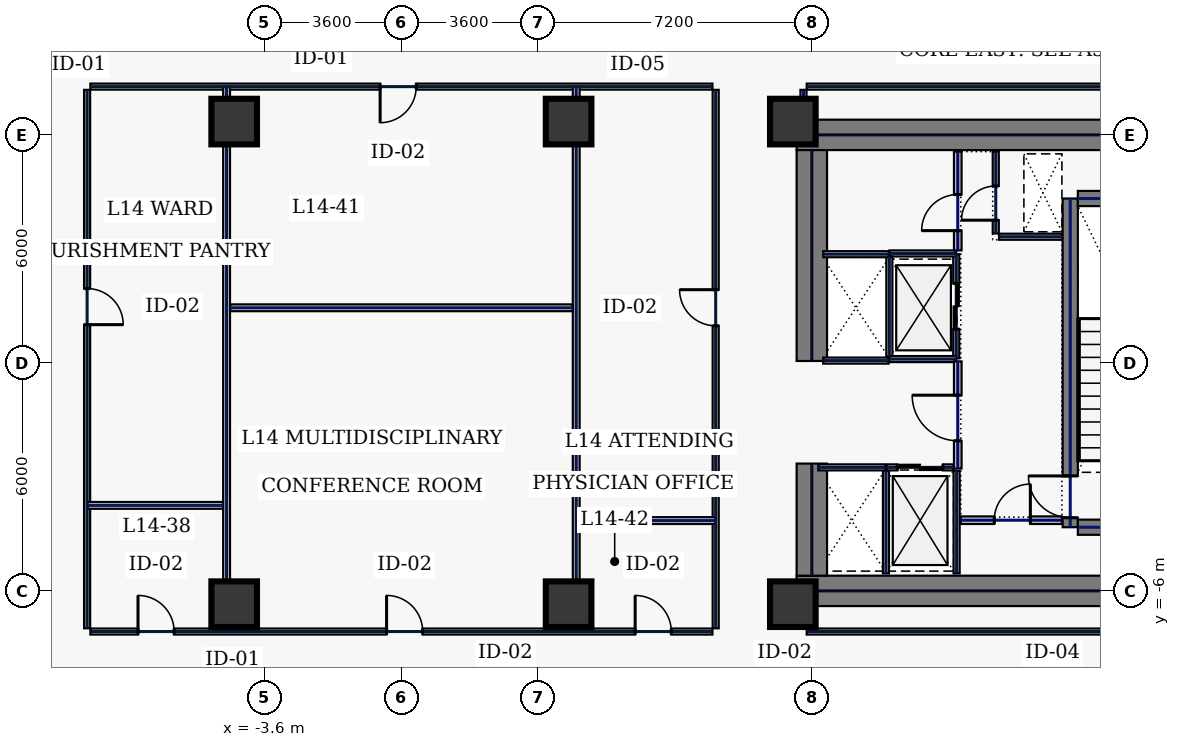
"""IFC4 building model, lengths in metres.
Left out: names, types, materials, properties, quantities, classifications, styles, units other than length and angle.
Written with IfcOpenShell. Run it as: python <this file> out.ifc"""

import sys

from ifc_helpers import new_model, si_unit, direction, frame, frame_2d, origin, origin_2d, place, context, subcontext, project, spatial, rectangle, hollow_rectangle, extrude, element, fill, save


model = new_model("IFC4")
c1 = context("Model", 3, precision=1e-05, world=origin(), true_north=direction((0.0, 1.0)))
c2 = subcontext(c1, "Body", "Model", "MODEL_VIEW")
j1 = project(units=[si_unit("LENGTHUNIT", "METRE"), si_unit("PLANEANGLEUNIT", "RADIAN")], contexts=[c1])
p1 = place(None, origin())
s1 = spatial("IfcSite", under=j1, at=p1, CompositionType="ELEMENT")
p2 = place(p1, origin())
s2 = spatial("IfcBuilding", under=s1, at=p2, CompositionType="ELEMENT")
p3 = place(p2, frame((0.0, 0.0, 67.4)))
s3 = spatial("IfcBuildingStorey", under=s2, at=p3, CompositionType="ELEMENT", Elevation=67.4)
for number, where, z_axis, x_axis in (
    (1, (10.4, 6.0, 0.0), (0.0, 0.0, 1.0), (1.0, 0.0, 0.0)),
    (2, (10.4, -6.0, 0.0), (0.0, 0.0, 1.0), (1.0, 0.0, 0.0)),
):
    element("IfcWall", number, at=place(p3, frame(where, z_axis=z_axis, x_axis=x_axis)), inside=s3, PredefinedType="SHEAR", context=c2, shape_type="SweptSolid", body=[
        extrude(rectangle(XDim=11.6, YDim=0.8, at=frame_2d((5.8, 0.0))), origin(), (0.0, 0.0, 1.0), 3.74),
    ])
p4 = place(p3, frame((10.8, -5.6, 0.0), z_axis=(0.0, 0.0, 1.0), x_axis=(0.0, 1.0, 0.0)))
e3 = element("IfcWall", 3, at=p4, inside=s3, PredefinedType="SHEAR", context=c2, shape_type="SweptSolid", body=[
    extrude(rectangle(XDim=2.95, YDim=0.8, at=frame_2d((1.475, 0.0))), origin(), (0.0, 0.0, 1.0), 3.74),
])
p5 = place(p3, frame((10.8, 0.05, 0.0), z_axis=(0.0, 0.0, 1.0), x_axis=(0.0, 1.0, 0.0)))
e4 = element("IfcWall", 4, at=p5, inside=s3, PredefinedType="SHEAR", context=c2, shape_type="SweptSolid", body=[
    extrude(rectangle(XDim=5.55, YDim=0.8, at=frame_2d((2.775, 0.0))), origin(), (0.0, 0.0, 1.0), 3.74),
])
p6 = place(p3, frame((17.6, -4.325, 0.0), z_axis=(0.0, 0.0, 1.0), x_axis=(0.0, 1.0, 0.0)))
e5 = element("IfcWall", 5, at=p6, inside=s3, PredefinedType="SHEAR", context=c2, shape_type="SweptSolid", body=[
    extrude(rectangle(XDim=8.65, YDim=0.4, at=frame_2d((4.325, 0.0))), origin(), (0.0, 0.0, 1.0), 3.74),
])
p7 = place(p6, frame((0.25, 0.0, 0.0)))
e6 = element("IfcOpeningElement", 6, at=p7, cuts=e5, PredefinedType="OPENING", context=c2, shape_type="SweptSolid", body=[
    extrude(rectangle(XDim=1.1, YDim=2.2, at=frame_2d((0.55, 1.1))), frame((0.0, 0.21, 0.0), z_axis=(0.0, -1.0, 0.0), x_axis=(1.0, 0.0, 0.0)), (0.0, 0.0, 1.0), 0.42),
])
for number, where, z_axis, x_axis in (
    (7, (17.8, -4.325, 0.0), (0.0, 0.0, 1.0), (1.0, 0.0, 0.0)),
    (8, (17.8, 4.325, 0.0), (0.0, 0.0, 1.0), (1.0, 0.0, 0.0)),
):
    element("IfcWall", number, at=place(p3, frame(where, z_axis=z_axis, x_axis=x_axis)), inside=s3, PredefinedType="SHEAR", context=c2, shape_type="SweptSolid", body=[
        extrude(rectangle(XDim=3.4, YDim=0.4, at=frame_2d((1.7, 0.0))), origin(), (0.0, 0.0, 1.0), 3.74),
    ])
for number, where, z_axis, x_axis in (
    (9, (10.3, -6.35, 0.0), (0.0, 0.0, 1.0), (1.0, 0.0, 0.0)),
    (10, (10.3, 6.35, 0.0), (0.0, 0.0, 1.0), (1.0, 0.0, 0.0)),
    (11, (-4.4, -6.35, 0.0), (0.0, 0.0, 1.0), (1.0, 0.0, 0.0)),
    (12, (4.4, -6.35, 0.0), (0.0, 0.0, 1.0), (1.0, 0.0, 0.0)),
    (13, (-4.4, 6.35, 0.0), (0.0, 0.0, 1.0), (1.0, 0.0, 0.0)),
    (14, (4.4, 6.35, 0.0), (0.0, 0.0, 1.0), (1.0, 0.0, 0.0)),
):
    element("IfcColumn", number, at=place(p3, frame(where, z_axis=z_axis, x_axis=x_axis)), inside=s3, PredefinedType="COLUMN", context=c2, shape_type="SweptSolid", body=[
        extrude(hollow_rectangle(XDim=1.2, YDim=1.2, WallThickness=0.05, at=origin_2d()), origin(), (0.0, 0.0, 1.0), 3.74),
    ])
p8 = place(p3, frame((14.6, 0.12, 0.0), z_axis=(0.0, 0.0, 1.0), x_axis=(0.0, 1.0, 0.0)))
e15 = element("IfcWall", 15, at=p8, inside=s3, PredefinedType="PARTITIONING", context=c2, shape_type="SweptSolid", body=[
    extrude(rectangle(XDim=2.74, YDim=0.16, at=frame_2d((1.37, 0.0))), origin(), (0.0, 0.0, 1.0), 3.74),
])
p9 = place(p8, frame((0.77, 0.0, 0.0)))
e16 = element("IfcOpeningElement", 16, at=p9, cuts=e15, PredefinedType="OPENING", context=c2, shape_type="SweptSolid", body=[
    extrude(rectangle(XDim=1.2, YDim=2.2, at=frame_2d((0.6, 1.1))), frame((0.0, 0.09, 0.0), z_axis=(0.0, -1.0, 0.0), x_axis=(1.0, 0.0, 0.0)), (0.0, 0.0, 1.0), 0.18),
])
for number, where, z_axis, x_axis in (
    (17, (12.84, 0.1, 0.0), (0.0, 0.0, 1.0), (1.0, 0.0, 0.0)),
    (18, (12.84, 2.88, 0.0), (0.0, 0.0, 1.0), (1.0, 0.0, 0.0)),
):
    element("IfcWall", number, at=place(p3, frame(where, z_axis=z_axis, x_axis=x_axis)), inside=s3, PredefinedType="PARTITIONING", context=c2, shape_type="SweptSolid", body=[
        extrude(rectangle(XDim=1.76, YDim=0.16, at=frame_2d((0.88, 0.0))), origin(), (0.0, 0.0, 1.0), 3.74),
    ])
p10 = place(p3, frame((12.84, 0.18, 0.0), z_axis=(0.0, 0.0, 1.0), x_axis=(0.0, 1.0, 0.0)))
e19 = element("IfcWall", 19, at=p10, inside=s3, PredefinedType="PARTITIONING", context=c2, shape_type="SweptSolid", body=[
    extrude(rectangle(XDim=2.62, YDim=0.16, at=frame_2d((1.31, 0.0))), origin(), (0.0, 0.0, 1.0), 3.74),
])
p11 = place(p3, frame((12.77, -2.75, 0.0), z_axis=(0.0, 0.0, 1.0), x_axis=(1.0, 0.0, 0.0)))
e20 = element("IfcWall", 20, at=p11, inside=s3, PredefinedType="PARTITIONING", context=c2, shape_type="SweptSolid", body=[
    extrude(rectangle(XDim=1.76, YDim=0.16, at=frame_2d((0.88, 0.0))), origin(), (0.0, 0.0, 1.0), 3.74),
])
p12 = place(p11, frame((0.28, 0.0, 0.0)))
e21 = element("IfcOpeningElement", 21, at=p12, cuts=e20, PredefinedType="OPENING", context=c2, shape_type="SweptSolid", body=[
    extrude(rectangle(XDim=1.2, YDim=2.2, at=frame_2d((0.6, 1.1))), frame((0.0, 0.09, 0.0), z_axis=(0.0, -1.0, 0.0), x_axis=(1.0, 0.0, 0.0)), (0.0, 0.0, 1.0), 0.18),
])
for number, where, z_axis, x_axis in (
    (22, (12.75, -5.54, 0.0), (0.0, 0.0, 1.0), (0.0, 1.0, 0.0)),
    (23, (14.61, -5.54, 0.0), (0.0, 0.0, 1.0), (0.0, 1.0, 0.0)),
):
    element("IfcWall", number, at=place(p3, frame(where, z_axis=z_axis, x_axis=x_axis)), inside=s3, PredefinedType="PARTITIONING", context=c2, shape_type="SweptSolid", body=[
        extrude(rectangle(XDim=2.7, YDim=0.16, at=frame_2d((1.35, 0.0))), origin(), (0.0, 0.0, 1.0), 3.74),
    ])
p13 = place(p3, frame((10.97, -2.75, 0.0), z_axis=(0.0, 0.0, 1.0), x_axis=(1.0, 0.0, 0.0)))
e24 = element("IfcWall", 24, at=p13, inside=s3, PredefinedType="PARTITIONING", context=c2, shape_type="SweptSolid", body=[
    extrude(rectangle(XDim=1.76, YDim=0.16, at=frame_2d((0.88, 0.0))), origin(), (0.0, 0.0, 1.0), 3.74),
])
for number, where, z_axis, x_axis in (
    (25, (11.1, 0.06, 0.0), (0.0, 0.0, 1.0), (1.0, 0.0, 0.0)),
    (26, (11.1, 2.86, 0.0), (0.0, 0.0, 1.0), (1.0, 0.0, 0.0)),
):
    element("IfcWall", number, at=place(p3, frame(where, z_axis=z_axis, x_axis=x_axis)), inside=s3, PredefinedType="PARTITIONING", context=c2, shape_type="SweptSolid", body=[
        extrude(rectangle(XDim=1.72, YDim=0.16, at=frame_2d((0.86, 0.0))), origin(), (0.0, 0.0, 1.0), 3.74),
    ])
p14 = place(p3, frame((15.64, 3.405, 0.0), z_axis=(0.0, 0.0, 1.0), x_axis=(0.0, 1.0, 0.0)))
e27 = element("IfcWall", 27, at=p14, inside=s3, PredefinedType="PARTITIONING", context=c2, shape_type="SweptSolid", body=[
    extrude(rectangle(XDim=2.155, YDim=0.16, at=frame_2d((1.078, 0.0))), origin(), (0.0, 0.0, 1.0), 3.74),
])
p15 = place(p14, frame((0.35, 0.0, 0.0)))
e28 = element("IfcOpeningElement", 28, at=p15, cuts=e27, PredefinedType="OPENING", context=c2, shape_type="SweptSolid", body=[
    extrude(rectangle(XDim=0.9, YDim=2.2, at=frame_2d((0.45, 1.1))), frame((0.0, 0.09, 0.0), z_axis=(0.0, -1.0, 0.0), x_axis=(1.0, 0.0, 0.0)), (0.0, 0.0, 1.0), 0.18),
])
p16 = place(p3, frame((15.725, 3.32, 0.0), z_axis=(0.0, 0.0, 1.0), x_axis=(1.0, 0.0, 0.0)))
e29 = element("IfcWall", 29, at=p16, inside=s3, PredefinedType="PARTITIONING", context=c2, shape_type="SweptSolid", body=[
    extrude(rectangle(XDim=1.655, YDim=0.16, at=frame_2d((0.827, 0.0))), origin(), (0.0, 0.0, 1.0), 3.74),
])
p17 = place(p3, frame((14.72, -4.14, 0.0), z_axis=(0.0, 0.0, 1.0), x_axis=(1.0, 0.0, 0.0)))
e30 = element("IfcWall", 30, at=p17, inside=s3, PredefinedType="SOLIDWALL", context=c2, shape_type="SweptSolid", body=[
    extrude(rectangle(XDim=2.66, YDim=0.2, at=frame_2d((1.33, 0.0))), origin(), (0.0, 0.0, 1.0), 3.74),
])
p18 = place(p17, frame((0.88, 0.0, 0.0)))
e31 = element("IfcOpeningElement", 31, at=p18, cuts=e30, PredefinedType="OPENING", context=c2, shape_type="SweptSolid", body=[
    extrude(rectangle(XDim=0.95, YDim=2.2, at=frame_2d((0.475, 1.1))), frame((0.0, 0.11, 0.0), z_axis=(0.0, -1.0, 0.0), x_axis=(1.0, 0.0, 0.0)), (0.0, 0.0, 1.0), 0.22),
])
p19 = place(p3, frame((14.64, 2.96, 0.0), z_axis=(0.0, 0.0, 1.0), x_axis=(0.0, 1.0, 0.0)))
e32 = element("IfcWall", 32, at=p19, inside=s3, PredefinedType="SOLIDWALL", context=c2, shape_type="SweptSolid", body=[
    extrude(rectangle(XDim=2.6, YDim=0.2, at=frame_2d((1.3, 0.0))), origin(), (0.0, 0.0, 1.0), 3.74),
])
p20 = place(p19, frame((0.52, 0.0, 0.0)))
e33 = element("IfcOpeningElement", 33, at=p20, cuts=e32, PredefinedType="OPENING", context=c2, shape_type="SweptSolid", body=[
    extrude(rectangle(XDim=0.95, YDim=2.2, at=frame_2d((0.475, 1.1))), frame((0.0, 0.11, 0.0), z_axis=(0.0, -1.0, 0.0), x_axis=(1.0, 0.0, 0.0)), (0.0, 0.0, 1.0), 0.22),
])
p21 = place(p3, frame((14.64, -2.78, 0.0), z_axis=(0.0, 0.0, 1.0), x_axis=(0.0, 1.0, 0.0)))
e34 = element("IfcWall", 34, at=p21, inside=s3, PredefinedType="SOLIDWALL", context=c2, shape_type="SweptSolid", body=[
    extrude(rectangle(XDim=2.82, YDim=0.2, at=frame_2d((1.41, 0.0))), origin(), (0.0, 0.0, 1.0), 3.74),
])
p22 = place(p21, frame((0.73, 0.0, 0.0)))
e35 = element("IfcOpeningElement", 35, at=p22, cuts=e34, PredefinedType="OPENING", context=c2, shape_type="SweptSolid", body=[
    extrude(rectangle(XDim=1.2, YDim=2.2, at=frame_2d((0.6, 1.1))), frame((0.0, 0.11, 0.0), z_axis=(0.0, -1.0, 0.0), x_axis=(1.0, 0.0, 0.0)), (0.0, 0.0, 1.0), 0.22),
])
p23 = place(p3, frame((27.185, 7.27, 0.0), z_axis=(0.0, 0.0, 1.0), x_axis=(-1.0, 0.0, 0.0)))
e36 = element("IfcWall", 36, at=p23, inside=s3, PredefinedType="PARTITIONING", context=c2, shape_type="SweptSolid", body=[
    extrude(rectangle(XDim=16.52, YDim=0.16, at=frame_2d((8.26, 0.0))), origin(), (0.0, 0.0, 1.0), 3.74),
])
p24 = place(p3, frame((10.58, 7.185, 0.0), z_axis=(0.0, 0.0, 1.0), x_axis=(0.0, -1.0, 0.0)))
e37 = element("IfcWall", 37, at=p24, inside=s3, PredefinedType="PARTITIONING", context=c2, shape_type="SweptSolid", body=[
    extrude(rectangle(XDim=0.765, YDim=0.16, at=frame_2d((0.383, 0.0))), origin(), (0.0, 0.0, 1.0), 1.535),
])
p25 = place(p3, frame((10.58, -6.42, 0.0), z_axis=(0.0, 0.0, 1.0), x_axis=(0.0, -1.0, 0.0)))
e38 = element("IfcWall", 38, at=p25, inside=s3, PredefinedType="PARTITIONING", context=c2, shape_type="SweptSolid", body=[
    extrude(rectangle(XDim=0.565, YDim=0.16, at=frame_2d((0.283, 0.0))), origin(), (0.0, 0.0, 1.0), 3.74),
])
p26 = place(p3, frame((10.665, -7.07, 0.0), z_axis=(0.0, 0.0, 1.0), x_axis=(1.0, 0.0, 0.0)))
e39 = element("IfcWall", 39, at=p26, inside=s3, PredefinedType="PARTITIONING", context=c2, shape_type="SweptSolid", body=[
    extrude(rectangle(XDim=16.52, YDim=0.16, at=frame_2d((8.26, 0.0))), origin(), (0.0, 0.0, 1.0), 3.74),
])
p27 = place(p3, frame((8.27, -6.985, 0.0), z_axis=(0.0, 0.0, 1.0), x_axis=(0.0, 1.0, 0.0)))
e40 = element("IfcWall", 40, at=p27, inside=s3, PredefinedType="PARTITIONING", context=c2, shape_type="SweptSolid", body=[
    extrude(rectangle(XDim=14.17, YDim=0.16, at=frame_2d((7.085, 0.0))), origin(), (0.0, 0.0, 1.0), 3.74),
])
p28 = place(p27, frame((7.961, 0.0, 0.0)))
e41 = element("IfcOpeningElement", 41, at=p28, cuts=e40, PredefinedType="OPENING", context=c2, shape_type="SweptSolid", body=[
    extrude(rectangle(XDim=0.95, YDim=2.2, at=frame_2d((0.475, 1.1))), frame((0.0, 0.09, 0.0), z_axis=(0.0, -1.0, 0.0), x_axis=(1.0, 0.0, 0.0)), (0.0, 0.0, 1.0), 0.18),
])
p29 = place(p3, frame((8.185, 7.27, 0.0), z_axis=(0.0, 0.0, 1.0), x_axis=(-1.0, 0.0, 0.0)))
e42 = element("IfcWall", 42, at=p29, inside=s3, PredefinedType="PARTITIONING", context=c2, shape_type="SweptSolid", body=[
    extrude(rectangle(XDim=16.37, YDim=0.16, at=frame_2d((8.185, 0.0))), origin(), (0.0, 0.0, 1.0), 3.74),
])
p30 = place(p29, frame((7.795, 0.0, 0.0)))
e43 = element("IfcOpeningElement", 43, at=p30, cuts=e42, PredefinedType="OPENING", context=c2, shape_type="SweptSolid", body=[
    extrude(rectangle(XDim=0.95, YDim=2.2, at=frame_2d((0.475, 1.1))), frame((0.0, 0.09, 0.0), z_axis=(0.0, -1.0, 0.0), x_axis=(1.0, 0.0, 0.0)), (0.0, 0.0, 1.0), 0.18),
])
p31 = place(p3, frame((-8.27, 7.185, 0.0), z_axis=(0.0, 0.0, 1.0), x_axis=(0.0, -1.0, 0.0)))
e44 = element("IfcWall", 44, at=p31, inside=s3, PredefinedType="PARTITIONING", context=c2, shape_type="SweptSolid", body=[
    extrude(rectangle(XDim=14.17, YDim=0.16, at=frame_2d((7.085, 0.0))), origin(), (0.0, 0.0, 1.0), 3.74),
])
p32 = place(p31, frame((5.229, 0.0, 0.0)))
e45 = element("IfcOpeningElement", 45, at=p32, cuts=e44, PredefinedType="OPENING", context=c2, shape_type="SweptSolid", body=[
    extrude(rectangle(XDim=0.95, YDim=2.2, at=frame_2d((0.475, 1.1))), frame((0.0, 0.09, 0.0), z_axis=(0.0, -1.0, 0.0), x_axis=(1.0, 0.0, 0.0)), (0.0, 0.0, 1.0), 0.18),
])
p33 = place(p3, frame((-8.185, -7.07, 0.0), z_axis=(0.0, 0.0, 1.0), x_axis=(1.0, 0.0, 0.0)))
e46 = element("IfcWall", 46, at=p33, inside=s3, PredefinedType="PARTITIONING", context=c2, shape_type="SweptSolid", body=[
    extrude(rectangle(XDim=16.37, YDim=0.16, at=frame_2d((8.185, 0.0))), origin(), (0.0, 0.0, 1.0), 3.74),
])
p34 = place(p33, frame((1.254, 0.0, 0.0)))
e47 = element("IfcOpeningElement", 47, at=p34, cuts=e46, PredefinedType="OPENING", context=c2, shape_type="SweptSolid", body=[
    extrude(rectangle(XDim=0.95, YDim=2.2, at=frame_2d((0.475, 1.1))), frame((0.0, 0.09, 0.0), z_axis=(0.0, -1.0, 0.0), x_axis=(1.0, 0.0, 0.0)), (0.0, 0.0, 1.0), 0.18),
])
p35 = place(p33, frame((7.795, 0.0, 0.0)))
e48 = element("IfcOpeningElement", 48, at=p35, cuts=e46, PredefinedType="OPENING", context=c2, shape_type="SweptSolid", body=[
    extrude(rectangle(XDim=0.95, YDim=2.2, at=frame_2d((0.475, 1.1))), frame((0.0, 0.09, 0.0), z_axis=(0.0, -1.0, 0.0), x_axis=(1.0, 0.0, 0.0)), (0.0, 0.0, 1.0), 0.18),
])
p36 = place(p33, frame((14.336, 0.0, 0.0)))
e49 = element("IfcOpeningElement", 49, at=p36, cuts=e46, PredefinedType="OPENING", context=c2, shape_type="SweptSolid", body=[
    extrude(rectangle(XDim=0.95, YDim=2.2, at=frame_2d((0.475, 1.1))), frame((0.0, 0.09, 0.0), z_axis=(0.0, -1.0, 0.0), x_axis=(1.0, 0.0, 0.0)), (0.0, 0.0, 1.0), 0.18),
])
for number, where, z_axis, x_axis in (
    (50, (-4.6, -7.065, 0.0), (0.0, 0.0, 1.0), (0.0, 1.0, 0.0)),
    (51, (4.6, -7.065, 0.0), (0.0, 0.0, 1.0), (0.0, 1.0, 0.0)),
):
    element("IfcWall", number, at=place(p3, frame(where, z_axis=z_axis, x_axis=x_axis)), inside=s3, PredefinedType="PARTITIONING", context=c2, shape_type="SweptSolid", body=[
        extrude(rectangle(XDim=14.33, YDim=0.18, at=frame_2d((7.165, 0.0))), origin(), (0.0, 0.0, 1.0), 2.935),
    ])
p37 = place(p3, frame((-4.505, 1.45, 0.0), z_axis=(0.0, 0.0, 1.0), x_axis=(1.0, 0.0, 0.0)))
e52 = element("IfcWall", 52, at=p37, inside=s3, PredefinedType="PARTITIONING", context=c2, shape_type="SweptSolid", body=[
    extrude(rectangle(XDim=9.01, YDim=0.18, at=frame_2d((4.505, 0.0))), origin(), (0.0, 0.0, 1.0), 3.74),
])
for number, where, z_axis, x_axis in (
    (53, (-8.265, -3.75, 0.0), (0.0, 0.0, 1.0), (1.0, 0.0, 0.0)),
    (54, (4.695, -4.15, 0.0), (0.0, 0.0, 1.0), (1.0, 0.0, 0.0)),
):
    element("IfcWall", number, at=place(p3, frame(where, z_axis=z_axis, x_axis=x_axis)), inside=s3, PredefinedType="PARTITIONING", context=c2, shape_type="SweptSolid", body=[
        extrude(rectangle(XDim=3.57, YDim=0.18, at=frame_2d((1.785, 0.0))), origin(), (0.0, 0.0, 1.0), 3.74),
    ])
p38 = place(p7, origin())
e55 = element("IfcDoor", 55, at=p38, inside=s3, OperationType="SINGLE_SWING_RIGHT", PredefinedType="DOOR", context=c2, shape_type="SweptSolid", body=[
    extrude(rectangle(XDim=1.1, YDim=2.2, at=frame_2d((0.55, 1.1))), frame((0.0, 0.025, 0.0), z_axis=(0.0, -1.0, 0.0), x_axis=(1.0, 0.0, 0.0)), (0.0, 0.0, 1.0), 0.05),
])
fill(e6, e55)
p39 = place(p9, origin())
e56 = element("IfcDoor", 56, at=p39, inside=s3, OperationType="SLIDING_TO_LEFT", PredefinedType="DOOR", context=c2, shape_type="SweptSolid", body=[
    extrude(rectangle(XDim=1.2, YDim=2.2, at=frame_2d((0.6, 1.1))), frame((0.0, 0.025, 0.0), z_axis=(0.0, -1.0, 0.0), x_axis=(1.0, 0.0, 0.0)), (0.0, 0.0, 1.0), 0.05),
])
fill(e16, e56)
p40 = place(p12, origin())
e57 = element("IfcDoor", 57, at=p40, inside=s3, OperationType="SLIDING_TO_LEFT", PredefinedType="DOOR", context=c2, shape_type="SweptSolid", body=[
    extrude(rectangle(XDim=1.2, YDim=2.2, at=frame_2d((0.6, 1.1))), frame((0.0, 0.025, 0.0), z_axis=(0.0, -1.0, 0.0), x_axis=(1.0, 0.0, 0.0)), (0.0, 0.0, 1.0), 0.05),
])
fill(e21, e57)
p41 = place(p15, origin())
e58 = element("IfcDoor", 58, at=p41, inside=s3, OperationType="SINGLE_SWING_LEFT", PredefinedType="DOOR", context=c2, shape_type="SweptSolid", body=[
    extrude(rectangle(XDim=0.9, YDim=2.2, at=frame_2d((0.45, 1.1))), frame((0.0, 0.025, 0.0), z_axis=(0.0, -1.0, 0.0), x_axis=(1.0, 0.0, 0.0)), (0.0, 0.0, 1.0), 0.05),
])
fill(e28, e58)
p42 = place(p18, origin())
e59 = element("IfcDoor", 59, at=p42, inside=s3, OperationType="SINGLE_SWING_RIGHT", PredefinedType="DOOR", context=c2, shape_type="SweptSolid", body=[
    extrude(rectangle(XDim=0.95, YDim=2.2, at=frame_2d((0.475, 1.1))), frame((0.0, 0.025, 0.0), z_axis=(0.0, -1.0, 0.0), x_axis=(1.0, 0.0, 0.0)), (0.0, 0.0, 1.0), 0.05),
])
fill(e31, e59)
p43 = place(p20, origin())
e60 = element("IfcDoor", 60, at=p43, inside=s3, OperationType="SINGLE_SWING_LEFT", PredefinedType="DOOR", context=c2, shape_type="SweptSolid", body=[
    extrude(rectangle(XDim=0.95, YDim=2.2, at=frame_2d((0.475, 1.1))), frame((0.0, 0.025, 0.0), z_axis=(0.0, -1.0, 0.0), x_axis=(1.0, 0.0, 0.0)), (0.0, 0.0, 1.0), 0.05),
])
fill(e33, e60)
p44 = place(p22, origin())
e61 = element("IfcDoor", 61, at=p44, inside=s3, OperationType="SINGLE_SWING_RIGHT", PredefinedType="DOOR", context=c2, shape_type="SweptSolid", body=[
    extrude(rectangle(XDim=1.2, YDim=2.2, at=frame_2d((0.6, 1.1))), frame((0.0, 0.025, 0.0), z_axis=(0.0, -1.0, 0.0), x_axis=(1.0, 0.0, 0.0)), (0.0, 0.0, 1.0), 0.05),
])
fill(e35, e61)
p45 = place(p34, origin())
e62 = element("IfcDoor", 62, at=p45, inside=s3, OperationType="SINGLE_SWING_LEFT", PredefinedType="DOOR", context=c2, shape_type="SweptSolid", body=[
    extrude(rectangle(XDim=0.95, YDim=2.2, at=frame_2d((0.475, 1.1))), frame((0.0, 0.025, 0.0), z_axis=(0.0, -1.0, 0.0), x_axis=(1.0, 0.0, 0.0)), (0.0, 0.0, 1.0), 0.05),
])
fill(e47, e62)
p46 = place(p32, origin())
e63 = element("IfcDoor", 63, at=p46, inside=s3, OperationType="SINGLE_SWING_RIGHT", PredefinedType="DOOR", context=c2, shape_type="SweptSolid", body=[
    extrude(rectangle(XDim=0.95, YDim=2.2, at=frame_2d((0.475, 1.1))), frame((0.0, 0.025, 0.0), z_axis=(0.0, -1.0, 0.0), x_axis=(1.0, 0.0, 0.0)), (0.0, 0.0, 1.0), 0.05),
])
fill(e45, e63)
p47 = place(p35, origin())
e64 = element("IfcDoor", 64, at=p47, inside=s3, OperationType="SINGLE_SWING_LEFT", PredefinedType="DOOR", context=c2, shape_type="SweptSolid", body=[
    extrude(rectangle(XDim=0.95, YDim=2.2, at=frame_2d((0.475, 1.1))), frame((0.0, 0.025, 0.0), z_axis=(0.0, -1.0, 0.0), x_axis=(1.0, 0.0, 0.0)), (0.0, 0.0, 1.0), 0.05),
])
fill(e48, e64)
p48 = place(p30, origin())
e65 = element("IfcDoor", 65, at=p48, inside=s3, OperationType="SINGLE_SWING_RIGHT", PredefinedType="DOOR", context=c2, shape_type="SweptSolid", body=[
    extrude(rectangle(XDim=0.95, YDim=2.2, at=frame_2d((0.475, 1.1))), frame((0.0, 0.025, 0.0), z_axis=(0.0, -1.0, 0.0), x_axis=(1.0, 0.0, 0.0)), (0.0, 0.0, 1.0), 0.05),
])
fill(e43, e65)
p49 = place(p36, origin())
e66 = element("IfcDoor", 66, at=p49, inside=s3, OperationType="SINGLE_SWING_LEFT", PredefinedType="DOOR", context=c2, shape_type="SweptSolid", body=[
    extrude(rectangle(XDim=0.95, YDim=2.2, at=frame_2d((0.475, 1.1))), frame((0.0, 0.025, 0.0), z_axis=(0.0, -1.0, 0.0), x_axis=(1.0, 0.0, 0.0)), (0.0, 0.0, 1.0), 0.05),
])
fill(e49, e66)
p50 = place(p28, origin())
e67 = element("IfcDoor", 67, at=p50, inside=s3, OperationType="SINGLE_SWING_RIGHT", PredefinedType="DOOR", context=c2, shape_type="SweptSolid", body=[
    extrude(rectangle(XDim=0.95, YDim=2.2, at=frame_2d((0.475, 1.1))), frame((0.0, 0.025, 0.0), z_axis=(0.0, -1.0, 0.0), x_axis=(1.0, 0.0, 0.0)), (0.0, 0.0, 1.0), 0.05),
])
fill(e41, e67)
save(model, sys.argv[1])
